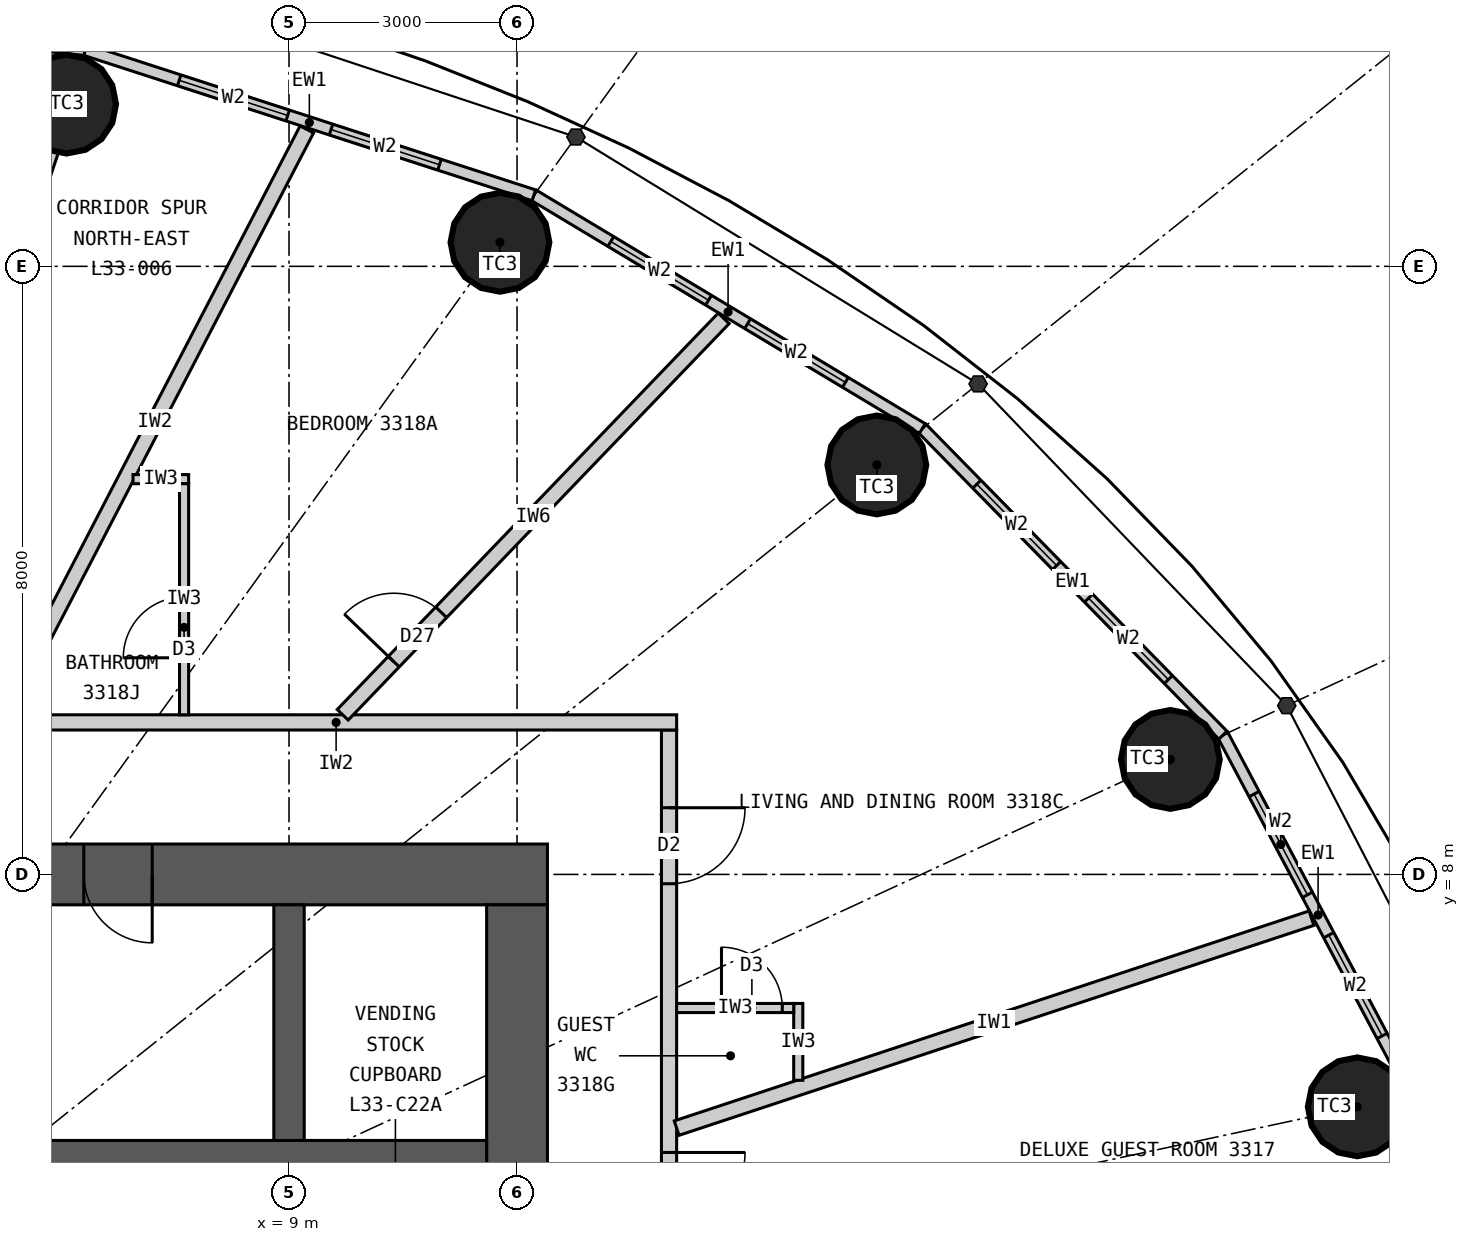
"""IFC4 building model, lengths in metres.
Left out: names, types, materials, properties, quantities, classifications, styles, units other than length and angle.
Written with IfcOpenShell. Run it as: python <this file> out.ifc"""

import sys

from ifc_helpers import new_model, si_unit, direction, frame, frame_2d, origin, origin_2d, place, context, subcontext, project, spatial, rectangle, circle, extrude, element, fill, save


model = new_model("IFC4")
c1 = context("Model", 3, precision=1e-05, world=origin(), true_north=direction((0.0, 1.0)))
c2 = subcontext(c1, "Body", "Model", "MODEL_VIEW")
j1 = project(units=[si_unit("LENGTHUNIT", "METRE"), si_unit("PLANEANGLEUNIT", "RADIAN")], contexts=[c1])
p1 = place(None, origin())
s1 = spatial("IfcSite", under=j1, at=p1, CompositionType="ELEMENT")
p2 = place(p1, origin())
s2 = spatial("IfcBuilding", under=s1, at=p2, CompositionType="ELEMENT")
p3 = place(p2, frame((0.0, 0.0, 128.7)))
s3 = spatial("IfcBuildingStorey", under=s2, at=p3, CompositionType="ELEMENT", Elevation=128.7)
for number, where, z_axis, x_axis in (
    (1, (23.055, 4.942, 0.0), (0.0, 0.0, 1.0), (1.0, 0.0, 0.0)),
    (2, (20.596, 9.513, 0.0), (0.0, 0.0, 1.0), (1.0, 0.0, 0.0)),
    (3, (16.734, 13.387, 0.0), (0.0, 0.0, 1.0), (1.0, 0.0, 0.0)),
    (4, (11.775, 16.316, 0.0), (0.0, 0.0, 1.0), (1.0, 0.0, 0.0)),
    (5, (6.074, 18.135, 0.0), (0.0, 0.0, 1.0), (1.0, 0.0, 0.0)),
):
    element("IfcColumn", number, at=place(p3, frame(where, z_axis=z_axis, x_axis=x_axis)), inside=s3, PredefinedType="COLUMN", context=c2, shape_type="SweptSolid", body=[
        extrude(circle(Radius=0.65, at=origin_2d()), origin(), (0.0, 0.0, 1.0), 3.3),
    ])
p4 = place(p3, frame((-12.4, 8.0, 0.0), z_axis=(0.0, 0.0, 1.0), x_axis=(1.0, 0.0, 0.0)))
e6 = element("IfcWall", 6, at=p4, inside=s3, PredefinedType="SHEAR", context=c2, shape_type="SweptSolid", body=[
    extrude(rectangle(XDim=24.8, YDim=0.8, at=frame_2d((12.4, 0.0))), origin(), (0.0, 0.0, 1.0), 3.3),
])
p5 = place(p4, frame((11.1, 0.0, 0.0)))
e7 = element("IfcOpeningElement", 7, at=p5, cuts=e6, PredefinedType="OPENING", context=c2, shape_type="SweptSolid", body=[
    extrude(rectangle(XDim=1.2, YDim=2.2, at=frame_2d((0.6, 1.1))), frame((0.0, 0.41, 0.0), z_axis=(0.0, -1.0, 0.0), x_axis=(1.0, 0.0, 0.0)), (0.0, 0.0, 1.0), 0.82),
])
p6 = place(p4, frame((18.7, 0.0, 0.0)))
e8 = element("IfcOpeningElement", 8, at=p6, cuts=e6, PredefinedType="OPENING", context=c2, shape_type="SweptSolid", body=[
    extrude(rectangle(XDim=0.9, YDim=2.2, at=frame_2d((0.45, 1.1))), frame((0.0, 0.41, 0.0), z_axis=(0.0, -1.0, 0.0), x_axis=(1.0, 0.0, 0.0)), (0.0, 0.0, 1.0), 0.82),
])
p7 = place(p3, frame((12.0, -7.6, 0.0), z_axis=(0.0, 0.0, 1.0), x_axis=(0.0, 1.0, 0.0)))
e9 = element("IfcWall", 9, at=p7, inside=s3, PredefinedType="SHEAR", context=c2, shape_type="SweptSolid", body=[
    extrude(rectangle(XDim=15.2, YDim=0.8, at=frame_2d((7.6, 0.0))), origin(), (0.0, 0.0, 1.0), 3.3),
])
p8 = place(p7, frame((6.7, 0.0, 0.0)))
e10 = element("IfcOpeningElement", 10, at=p8, cuts=e9, PredefinedType="OPENING", context=c2, shape_type="SweptSolid", body=[
    extrude(rectangle(XDim=1.8, YDim=2.2, at=frame_2d((0.9, 1.1))), frame((0.0, 0.41, 0.0), z_axis=(0.0, -1.0, 0.0), x_axis=(1.0, 0.0, 0.0)), (0.0, 0.0, 1.0), 0.82),
])
p9 = place(p3, frame((-11.6, 4.3, 0.0), z_axis=(0.0, 0.0, 1.0), x_axis=(1.0, 0.0, 0.0)))
e11 = element("IfcWall", 11, at=p9, inside=s3, PredefinedType="SHEAR", context=c2, shape_type="SweptSolid", body=[
    extrude(rectangle(XDim=23.2, YDim=0.4, at=frame_2d((11.6, 0.0))), origin(), (0.0, 0.0, 1.0), 3.3),
])
p10 = place(p3, frame((9.0, 4.5, 0.0), z_axis=(0.0, 0.0, 1.0), x_axis=(0.0, 1.0, 0.0)))
e12 = element("IfcWall", 12, at=p10, inside=s3, PredefinedType="SHEAR", context=c2, shape_type="SweptSolid", body=[
    extrude(rectangle(XDim=3.1, YDim=0.4, at=frame_2d((1.55, 0.0))), origin(), (0.0, 0.0, 1.0), 3.3),
])
p11 = place(p3, frame((23.792, 5.1, 0.0), z_axis=(0.0, 0.0, 1.0), x_axis=(-0.467814388454, 0.883826735257, 0.0)))
e13 = element("IfcWall", 13, at=p11, inside=s3, PredefinedType="ELEMENTEDWALL", context=c2, shape_type="SweptSolid", body=[
    extrude(rectangle(XDim=5.354, YDim=0.15, at=frame_2d((2.677, 0.0))), origin(), (0.0, 0.0, 1.0), 3.12),
])
p12 = place(p11, frame((0.877, 0.0, 0.9)))
e14 = element("IfcOpeningElement", 14, at=p12, cuts=e13, PredefinedType="OPENING", context=c2, shape_type="SweptSolid", body=[
    extrude(rectangle(XDim=1.5, YDim=1.9, at=frame_2d((0.75, 0.95))), frame((0.0, 0.085, 0.0), z_axis=(0.0, -1.0, 0.0), x_axis=(1.0, 0.0, 0.0)), (0.0, 0.0, 1.0), 0.17),
])
p13 = place(p11, frame((2.977, 0.0, 0.9)))
e15 = element("IfcOpeningElement", 15, at=p13, cuts=e13, PredefinedType="OPENING", context=c2, shape_type="SweptSolid", body=[
    extrude(rectangle(XDim=1.5, YDim=1.9, at=frame_2d((0.75, 0.95))), frame((0.0, 0.085, 0.0), z_axis=(0.0, -1.0, 0.0), x_axis=(1.0, 0.0, 0.0)), (0.0, 0.0, 1.0), 0.17),
])
p14 = place(p3, frame((21.287, 9.832, 0.0), z_axis=(0.0, 0.0, 1.0), x_axis=(-0.700136650834, 0.714008872605, 0.0)))
e16 = element("IfcWall", 16, at=p14, inside=s3, PredefinedType="ELEMENTEDWALL", context=c2, shape_type="SweptSolid", body=[
    extrude(rectangle(XDim=5.649, YDim=0.15, at=frame_2d((2.825, 0.0))), origin(), (0.0, 0.0, 1.0), 3.12),
])
p15 = place(p14, frame((1.025, 0.0, 0.9)))
e17 = element("IfcOpeningElement", 17, at=p15, cuts=e16, PredefinedType="OPENING", context=c2, shape_type="SweptSolid", body=[
    extrude(rectangle(XDim=1.5, YDim=1.9, at=frame_2d((0.75, 0.95))), frame((0.0, 0.085, 0.0), z_axis=(0.0, -1.0, 0.0), x_axis=(1.0, 0.0, 0.0)), (0.0, 0.0, 1.0), 0.17),
])
p16 = place(p14, frame((3.125, 0.0, 0.9)))
e18 = element("IfcOpeningElement", 18, at=p16, cuts=e16, PredefinedType="OPENING", context=c2, shape_type="SweptSolid", body=[
    extrude(rectangle(XDim=1.5, YDim=1.9, at=frame_2d((0.75, 0.95))), frame((0.0, 0.085, 0.0), z_axis=(0.0, -1.0, 0.0), x_axis=(1.0, 0.0, 0.0)), (0.0, 0.0, 1.0), 0.17),
])
p17 = place(p3, frame((17.332, 13.866, 0.0), z_axis=(0.0, 0.0, 1.0), x_axis=(-0.857308573723, 0.514802884044, 0.0)))
e19 = element("IfcWall", 19, at=p17, inside=s3, PredefinedType="ELEMENTEDWALL", context=c2, shape_type="SweptSolid", body=[
    extrude(rectangle(XDim=5.961, YDim=0.15, at=frame_2d((2.98, 0.0))), origin(), (0.0, 0.0, 1.0), 3.12),
])
p18 = place(p17, frame((1.181, 0.0, 0.9)))
e20 = element("IfcOpeningElement", 20, at=p18, cuts=e19, PredefinedType="OPENING", context=c2, shape_type="SweptSolid", body=[
    extrude(rectangle(XDim=1.5, YDim=1.9, at=frame_2d((0.75, 0.95))), frame((0.0, 0.085, 0.0), z_axis=(0.0, -1.0, 0.0), x_axis=(1.0, 0.0, 0.0)), (0.0, 0.0, 1.0), 0.17),
])
p19 = place(p17, frame((3.281, 0.0, 0.9)))
e21 = element("IfcOpeningElement", 21, at=p19, cuts=e19, PredefinedType="OPENING", context=c2, shape_type="SweptSolid", body=[
    extrude(rectangle(XDim=1.5, YDim=1.9, at=frame_2d((0.75, 0.95))), frame((0.0, 0.085, 0.0), z_axis=(0.0, -1.0, 0.0), x_axis=(1.0, 0.0, 0.0)), (0.0, 0.0, 1.0), 0.17),
])
p20 = place(p3, frame((12.221, 16.935, 0.0), z_axis=(0.0, 0.0, 1.0), x_axis=(-0.951272691506, 0.308350881944, 0.0)))
e22 = element("IfcWall", 22, at=p20, inside=s3, PredefinedType="ELEMENTEDWALL", context=c2, shape_type="SweptSolid", body=[
    extrude(rectangle(XDim=6.211, YDim=0.15, at=frame_2d((3.105, 0.0))), origin(), (0.0, 0.0, 1.0), 3.12),
])
p21 = place(p20, frame((1.305, 0.0, 0.9)))
e23 = element("IfcOpeningElement", 23, at=p21, cuts=e22, PredefinedType="OPENING", context=c2, shape_type="SweptSolid", body=[
    extrude(rectangle(XDim=1.5, YDim=1.9, at=frame_2d((0.75, 0.95))), frame((0.0, 0.085, 0.0), z_axis=(0.0, -1.0, 0.0), x_axis=(1.0, 0.0, 0.0)), (0.0, 0.0, 1.0), 0.17),
])
p22 = place(p20, frame((3.405, 0.0, 0.9)))
e24 = element("IfcOpeningElement", 24, at=p22, cuts=e22, PredefinedType="OPENING", context=c2, shape_type="SweptSolid", body=[
    extrude(rectangle(XDim=1.5, YDim=1.9, at=frame_2d((0.75, 0.95))), frame((0.0, 0.085, 0.0), z_axis=(0.0, -1.0, 0.0), x_axis=(1.0, 0.0, 0.0)), (0.0, 0.0, 1.0), 0.17),
])
p23 = place(p3, frame((6.313, 18.85, 0.0), z_axis=(0.0, 0.0, 1.0), x_axis=(-0.994735690163, 0.102473931887, 0.0)))
e25 = element("IfcWall", 25, at=p23, inside=s3, PredefinedType="ELEMENTEDWALL", context=c2, shape_type="SweptSolid", body=[
    extrude(rectangle(XDim=6.347, YDim=0.15, at=frame_2d((3.173, 0.0))), origin(), (0.0, 0.0, 1.0), 3.12),
])
p24 = place(p23, frame((1.373, 0.0, 0.9)))
e26 = element("IfcOpeningElement", 26, at=p24, cuts=e25, PredefinedType="OPENING", context=c2, shape_type="SweptSolid", body=[
    extrude(rectangle(XDim=1.5, YDim=1.9, at=frame_2d((0.75, 0.95))), frame((0.0, 0.085, 0.0), z_axis=(0.0, -1.0, 0.0), x_axis=(1.0, 0.0, 0.0)), (0.0, 0.0, 1.0), 0.17),
])
p25 = place(p23, frame((3.473, 0.0, 0.9)))
e27 = element("IfcOpeningElement", 27, at=p25, cuts=e25, PredefinedType="OPENING", context=c2, shape_type="SweptSolid", body=[
    extrude(rectangle(XDim=1.5, YDim=1.9, at=frame_2d((0.75, 0.95))), frame((0.0, 0.085, 0.0), z_axis=(0.0, -1.0, 0.0), x_axis=(1.0, 0.0, 0.0)), (0.0, 0.0, 1.0), 0.17),
])
p26 = place(p3, frame((14.0, -9.9, 0.0), z_axis=(0.0, 0.0, 1.0), x_axis=(0.0, 1.0, 0.0)))
e28 = element("IfcWall", 28, at=p26, inside=s3, PredefinedType="PARTITIONING", context=c2, shape_type="SweptSolid", body=[
    extrude(rectangle(XDim=19.8, YDim=0.2, at=frame_2d((9.9, 0.0))), origin(), (0.0, 0.0, 1.0), 3.12),
])
p27 = place(p26, frame((1.025, 0.0, 0.0)))
e29 = element("IfcOpeningElement", 29, at=p27, cuts=e28, PredefinedType="OPENING", context=c2, shape_type="SweptSolid", body=[
    extrude(rectangle(XDim=1.0, YDim=2.2, at=frame_2d((0.5, 1.1))), frame((0.0, 0.11, 0.0), z_axis=(0.0, -1.0, 0.0), x_axis=(1.0, 0.0, 0.0)), (0.0, 0.0, 1.0), 0.22),
])
p28 = place(p26, frame((6.798, 0.0, 0.0)))
e30 = element("IfcOpeningElement", 30, at=p28, cuts=e28, PredefinedType="OPENING", context=c2, shape_type="SweptSolid", body=[
    extrude(rectangle(XDim=1.0, YDim=2.2, at=frame_2d((0.5, 1.1))), frame((0.0, 0.11, 0.0), z_axis=(0.0, -1.0, 0.0), x_axis=(1.0, 0.0, 0.0)), (0.0, 0.0, 1.0), 0.22),
])
p29 = place(p26, frame((13.242, 0.0, 0.0)))
e31 = element("IfcOpeningElement", 31, at=p29, cuts=e28, PredefinedType="OPENING", context=c2, shape_type="SweptSolid", body=[
    extrude(rectangle(XDim=1.0, YDim=2.2, at=frame_2d((0.5, 1.1))), frame((0.0, 0.11, 0.0), z_axis=(0.0, -1.0, 0.0), x_axis=(1.0, 0.0, 0.0)), (0.0, 0.0, 1.0), 0.22),
])
p30 = place(p26, frame((17.777, 0.0, 0.0)))
e32 = element("IfcOpeningElement", 32, at=p30, cuts=e28, PredefinedType="OPENING", context=c2, shape_type="SweptSolid", body=[
    extrude(rectangle(XDim=1.0, YDim=2.2, at=frame_2d((0.5, 1.1))), frame((0.0, 0.11, 0.0), z_axis=(0.0, -1.0, 0.0), x_axis=(1.0, 0.0, 0.0)), (0.0, 0.0, 1.0), 0.22),
])
p31 = place(p3, frame((5.139, 10.0, 0.0), z_axis=(0.0, 0.0, 1.0), x_axis=(1.0, 0.0, 0.0)))
e33 = element("IfcWall", 33, at=p31, inside=s3, PredefinedType="PARTITIONING", context=c2, shape_type="SweptSolid", body=[
    extrude(rectangle(XDim=8.961, YDim=0.2, at=frame_2d((4.48, 0.0))), origin(), (0.0, 0.0, 1.0), 3.12),
])
p32 = place(p3, frame((14.1, 4.662, 0.0), z_axis=(0.0, 0.0, 1.0), x_axis=(0.949446466373, 0.313928984789, 0.0)))
e34 = element("IfcWall", 34, at=p32, inside=s3, PredefinedType="PARTITIONING", context=c2, shape_type="SweptSolid", body=[
    extrude(rectangle(XDim=8.797, YDim=0.2, at=frame_2d((4.399, 0.0))), origin(), (0.0, 0.0, 1.0), 3.12),
])
p33 = place(p3, frame((9.706, 10.1, 0.0), z_axis=(0.0, 0.0, 1.0), x_axis=(0.692944801824, 0.720990639069, 0.0)))
e35 = element("IfcWall", 35, at=p33, inside=s3, PredefinedType="PARTITIONING", context=c2, shape_type="SweptSolid", body=[
    extrude(rectangle(XDim=7.234, YDim=0.2, at=frame_2d((3.617, 0.0))), origin(), (0.0, 0.0, 1.0), 3.12),
])
p34 = place(p33, frame((0.97, 0.0, 0.0)))
e36 = element("IfcOpeningElement", 36, at=p34, cuts=e35, PredefinedType="OPENING", context=c2, shape_type="SweptSolid", body=[
    extrude(rectangle(XDim=0.9, YDim=2.1, at=frame_2d((0.45, 1.05))), frame((0.0, 0.11, 0.0), z_axis=(0.0, -1.0, 0.0), x_axis=(1.0, 0.0, 0.0)), (0.0, 0.0, 1.0), 0.22),
])
p35 = place(p3, frame((5.239, 10.1, 0.0), z_axis=(0.0, 0.0, 1.0), x_axis=(0.4604797896, 0.887670188398, 0.0)))
e37 = element("IfcWall", 37, at=p35, inside=s3, PredefinedType="PARTITIONING", context=c2, shape_type="SweptSolid", body=[
    extrude(rectangle(XDim=8.676, YDim=0.2, at=frame_2d((4.338, 0.0))), origin(), (0.0, 0.0, 1.0), 3.12),
])
p36 = place(p3, frame((3.383, 10.1, 0.0), z_axis=(0.0, 0.0, 1.0), x_axis=(0.317603705574, 0.948223542318, 0.0)))
e38 = element("IfcWall", 38, at=p36, inside=s3, PredefinedType="PARTITIONING", context=c2, shape_type="SweptSolid", body=[
    extrude(rectangle(XDim=7.823, YDim=0.2, at=frame_2d((3.912, 0.0))), origin(), (0.0, 0.0, 1.0), 2.37),
])
p37 = place(p36, frame((1.86, 0.0, 0.0)))
e39 = element("IfcOpeningElement", 39, at=p37, cuts=e38, PredefinedType="OPENING", context=c2, shape_type="SweptSolid", body=[
    extrude(rectangle(XDim=1.0, YDim=2.2, at=frame_2d((0.5, 1.1))), frame((0.0, 0.11, 0.0), z_axis=(0.0, -1.0, 0.0), x_axis=(1.0, 0.0, 0.0)), (0.0, 0.0, 1.0), 0.22),
])
p38 = place(p3, frame((15.7, 5.291, 0.0), z_axis=(0.0, 0.0, 1.0), x_axis=(0.0, 1.0, 0.0)))
e40 = element("IfcWall", 40, at=p38, inside=s3, PredefinedType="PARTITIONING", context=c2, shape_type="SweptSolid", body=[
    extrude(rectangle(XDim=1.011, YDim=0.12, at=frame_2d((0.505, 0.0))), origin(), (0.0, 0.0, 1.0), 3.12),
])
p39 = place(p3, frame((14.1, 6.242, 0.0), z_axis=(0.0, 0.0, 1.0), x_axis=(1.0, 0.0, 0.0)))
e41 = element("IfcWall", 41, at=p39, inside=s3, PredefinedType="PARTITIONING", context=c2, shape_type="SweptSolid", body=[
    extrude(rectangle(XDim=1.54, YDim=0.12, at=frame_2d((0.77, 0.0))), origin(), (0.0, 0.0, 1.0), 3.12),
])
p40 = place(p39, frame((0.59, 0.0, 0.0)))
e42 = element("IfcOpeningElement", 42, at=p40, cuts=e41, PredefinedType="OPENING", context=c2, shape_type="SweptSolid", body=[
    extrude(rectangle(XDim=0.8, YDim=2.1, at=frame_2d((0.4, 1.05))), frame((0.0, 0.07, 0.0), z_axis=(0.0, -1.0, 0.0), x_axis=(1.0, 0.0, 0.0)), (0.0, 0.0, 1.0), 0.14),
])
p41 = place(p3, frame((6.947, 13.2, 0.0), z_axis=(0.0, 0.0, 1.0), x_axis=(1.0, 0.0, 0.0)))
e43 = element("IfcWall", 43, at=p41, inside=s3, PredefinedType="PARTITIONING", context=c2, shape_type="SweptSolid", body=[
    extrude(rectangle(XDim=0.732, YDim=0.12, at=frame_2d((0.366, 0.0))), origin(), (0.0, 0.0, 1.0), 3.12),
])
p42 = place(p3, frame((7.619, 10.1, 0.0), z_axis=(0.0, 0.0, 1.0), x_axis=(0.0, 1.0, 0.0)))
e44 = element("IfcWall", 44, at=p42, inside=s3, PredefinedType="PARTITIONING", context=c2, shape_type="SweptSolid", body=[
    extrude(rectangle(XDim=3.04, YDim=0.12, at=frame_2d((1.52, 0.0))), origin(), (0.0, 0.0, 1.0), 3.12),
])
p43 = place(p42, frame((0.75, 0.0, 0.0)))
e45 = element("IfcOpeningElement", 45, at=p43, cuts=e44, PredefinedType="OPENING", context=c2, shape_type="SweptSolid", body=[
    extrude(rectangle(XDim=0.8, YDim=2.1, at=frame_2d((0.4, 1.05))), frame((0.0, 0.07, 0.0), z_axis=(0.0, -1.0, 0.0), x_axis=(1.0, 0.0, 0.0)), (0.0, 0.0, 1.0), 0.14),
])
p44 = place(p12, origin())
e46 = element("IfcWindow", 46, at=p44, inside=s3, PartitioningType="SINGLE_PANEL", PredefinedType="WINDOW", context=c2, shape_type="SweptSolid", body=[
    extrude(rectangle(XDim=1.5, YDim=1.9, at=frame_2d((0.75, 0.95))), frame((0.0, 0.03, 0.0), z_axis=(0.0, -1.0, 0.0), x_axis=(1.0, 0.0, 0.0)), (0.0, 0.0, 1.0), 0.06),
])
fill(e14, e46)
p45 = place(p13, origin())
e47 = element("IfcWindow", 47, at=p45, inside=s3, PartitioningType="SINGLE_PANEL", PredefinedType="WINDOW", context=c2, shape_type="SweptSolid", body=[
    extrude(rectangle(XDim=1.5, YDim=1.9, at=frame_2d((0.75, 0.95))), frame((0.0, 0.03, 0.0), z_axis=(0.0, -1.0, 0.0), x_axis=(1.0, 0.0, 0.0)), (0.0, 0.0, 1.0), 0.06),
])
fill(e15, e47)
p46 = place(p15, origin())
e48 = element("IfcWindow", 48, at=p46, inside=s3, PartitioningType="SINGLE_PANEL", PredefinedType="WINDOW", context=c2, shape_type="SweptSolid", body=[
    extrude(rectangle(XDim=1.5, YDim=1.9, at=frame_2d((0.75, 0.95))), frame((0.0, 0.03, 0.0), z_axis=(0.0, -1.0, 0.0), x_axis=(1.0, 0.0, 0.0)), (0.0, 0.0, 1.0), 0.06),
])
fill(e17, e48)
p47 = place(p16, origin())
e49 = element("IfcWindow", 49, at=p47, inside=s3, PartitioningType="SINGLE_PANEL", PredefinedType="WINDOW", context=c2, shape_type="SweptSolid", body=[
    extrude(rectangle(XDim=1.5, YDim=1.9, at=frame_2d((0.75, 0.95))), frame((0.0, 0.03, 0.0), z_axis=(0.0, -1.0, 0.0), x_axis=(1.0, 0.0, 0.0)), (0.0, 0.0, 1.0), 0.06),
])
fill(e18, e49)
p48 = place(p18, origin())
e50 = element("IfcWindow", 50, at=p48, inside=s3, PartitioningType="SINGLE_PANEL", PredefinedType="WINDOW", context=c2, shape_type="SweptSolid", body=[
    extrude(rectangle(XDim=1.5, YDim=1.9, at=frame_2d((0.75, 0.95))), frame((0.0, 0.03, 0.0), z_axis=(0.0, -1.0, 0.0), x_axis=(1.0, 0.0, 0.0)), (0.0, 0.0, 1.0), 0.06),
])
fill(e20, e50)
p49 = place(p19, origin())
e51 = element("IfcWindow", 51, at=p49, inside=s3, PartitioningType="SINGLE_PANEL", PredefinedType="WINDOW", context=c2, shape_type="SweptSolid", body=[
    extrude(rectangle(XDim=1.5, YDim=1.9, at=frame_2d((0.75, 0.95))), frame((0.0, 0.03, 0.0), z_axis=(0.0, -1.0, 0.0), x_axis=(1.0, 0.0, 0.0)), (0.0, 0.0, 1.0), 0.06),
])
fill(e21, e51)
p50 = place(p21, origin())
e52 = element("IfcWindow", 52, at=p50, inside=s3, PartitioningType="SINGLE_PANEL", PredefinedType="WINDOW", context=c2, shape_type="SweptSolid", body=[
    extrude(rectangle(XDim=1.5, YDim=1.9, at=frame_2d((0.75, 0.95))), frame((0.0, 0.03, 0.0), z_axis=(0.0, -1.0, 0.0), x_axis=(1.0, 0.0, 0.0)), (0.0, 0.0, 1.0), 0.06),
])
fill(e23, e52)
p51 = place(p22, origin())
e53 = element("IfcWindow", 53, at=p51, inside=s3, PartitioningType="SINGLE_PANEL", PredefinedType="WINDOW", context=c2, shape_type="SweptSolid", body=[
    extrude(rectangle(XDim=1.5, YDim=1.9, at=frame_2d((0.75, 0.95))), frame((0.0, 0.03, 0.0), z_axis=(0.0, -1.0, 0.0), x_axis=(1.0, 0.0, 0.0)), (0.0, 0.0, 1.0), 0.06),
])
fill(e24, e53)
p52 = place(p29, origin())
e54 = element("IfcDoor", 54, at=p52, inside=s3, OperationType="SINGLE_SWING_RIGHT", PredefinedType="DOOR", context=c2, shape_type="SweptSolid", body=[
    extrude(rectangle(XDim=1.0, YDim=2.2, at=frame_2d((0.5, 1.1))), frame((0.0, 0.025, 0.0), z_axis=(0.0, -1.0, 0.0), x_axis=(1.0, 0.0, 0.0)), (0.0, 0.0, 1.0), 0.05),
])
fill(e31, e54)
p53 = place(p40, origin())
e55 = element("IfcDoor", 55, at=p53, inside=s3, OperationType="SINGLE_SWING_LEFT", PredefinedType="DOOR", context=c2, shape_type="SweptSolid", body=[
    extrude(rectangle(XDim=0.8, YDim=2.1, at=frame_2d((0.4, 1.05))), frame((0.0, 0.025, 0.0), z_axis=(0.0, -1.0, 0.0), x_axis=(1.0, 0.0, 0.0)), (0.0, 0.0, 1.0), 0.05),
])
fill(e42, e55)
p54 = place(p30, origin())
e56 = element("IfcDoor", 56, at=p54, inside=s3, OperationType="SINGLE_SWING_RIGHT", PredefinedType="DOOR", context=c2, shape_type="SweptSolid", body=[
    extrude(rectangle(XDim=1.0, YDim=2.2, at=frame_2d((0.5, 1.1))), frame((0.0, 0.025, 0.0), z_axis=(0.0, -1.0, 0.0), x_axis=(1.0, 0.0, 0.0)), (0.0, 0.0, 1.0), 0.05),
])
fill(e32, e56)
p55 = place(p43, origin())
e57 = element("IfcDoor", 57, at=p55, inside=s3, OperationType="SINGLE_SWING_LEFT", PredefinedType="DOOR", context=c2, shape_type="SweptSolid", body=[
    extrude(rectangle(XDim=0.8, YDim=2.1, at=frame_2d((0.4, 1.05))), frame((0.0, 0.025, 0.0), z_axis=(0.0, -1.0, 0.0), x_axis=(1.0, 0.0, 0.0)), (0.0, 0.0, 1.0), 0.05),
])
fill(e45, e57)
p56 = place(p34, origin())
e58 = element("IfcDoor", 58, at=p56, inside=s3, OperationType="SINGLE_SWING_LEFT", PredefinedType="DOOR", context=c2, shape_type="SweptSolid", body=[
    extrude(rectangle(XDim=0.9, YDim=2.1, at=frame_2d((0.45, 1.05))), frame((0.0, 0.025, 0.0), z_axis=(0.0, -1.0, 0.0), x_axis=(1.0, 0.0, 0.0)), (0.0, 0.0, 1.0), 0.05),
])
fill(e36, e58)
p57 = place(p6, origin())
e59 = element("IfcDoor", 59, at=p57, inside=s3, OperationType="SINGLE_SWING_RIGHT", PredefinedType="DOOR", context=c2, shape_type="SweptSolid", body=[
    extrude(rectangle(XDim=0.9, YDim=2.2, at=frame_2d((0.45, 1.1))), frame((0.0, 0.025, 0.0), z_axis=(0.0, -1.0, 0.0), x_axis=(1.0, 0.0, 0.0)), (0.0, 0.0, 1.0), 0.05),
])
fill(e8, e59)
save(model, sys.argv[1])
